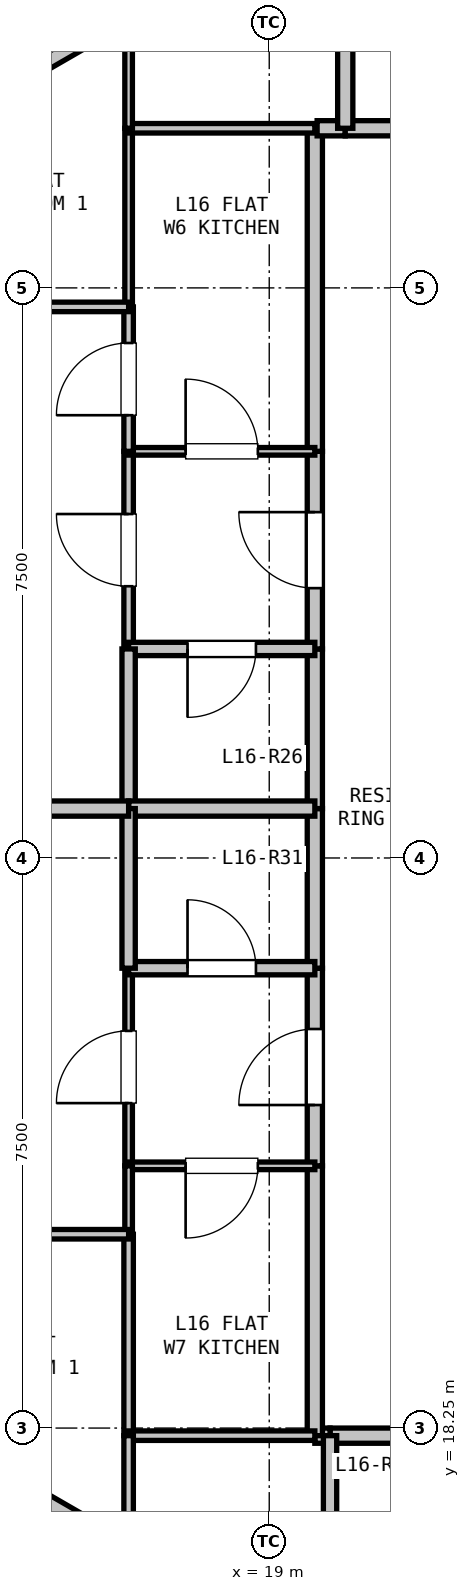
"""IFC4 building model, lengths in metres.
Left out: names, types, materials, properties, quantities, classifications, styles, units other than length and angle.
Written with IfcOpenShell. Run it as: python <this file> out.ifc"""

import sys

from ifc_helpers import new_model, si_unit, direction, frame, frame_2d, origin, place, context, subcontext, project, spatial, rectangle, extrude, element, fill, save


model = new_model("IFC4")
c1 = context("Model", 3, precision=1e-05, world=origin(), true_north=direction((0.0, 1.0)))
c2 = subcontext(c1, "Body", "Model", "MODEL_VIEW")
j1 = project(units=[si_unit("LENGTHUNIT", "METRE"), si_unit("PLANEANGLEUNIT", "RADIAN")], contexts=[c1])
p1 = place(None, origin())
s1 = spatial("IfcSite", under=j1, at=p1, CompositionType="ELEMENT")
p2 = place(p1, origin())
s2 = spatial("IfcBuilding", under=s1, at=p2, CompositionType="ELEMENT")
p3 = place(p2, frame((0.0, 0.0, 58.8)))
s3 = spatial("IfcBuildingStorey", under=s2, at=p3, CompositionType="ELEMENT", Elevation=58.8)
for number, where, z_axis, x_axis in (
    (1, (15.008, 35.611, 0.0), (0.0, 0.0, 1.0), (0.866, 0.5, 0.0)),
    (2, (16.48, 17.039, 0.0), (0.0, 0.0, 1.0), (-0.866, 0.5, 0.0)),
):
    element("IfcWall", number, at=place(p3, frame(where, z_axis=z_axis, x_axis=x_axis)), inside=s3, PredefinedType="PARAPET", context=c2, shape_type="SweptSolid", body=[
        extrude(rectangle(XDim=1.7, YDim=0.2, at=frame_2d((0.85, 0.0))), origin(), (0.0, 0.0, 1.0), 2.64),
    ])
p4 = place(p3, frame((21.8, 18.15, 0.0), z_axis=(0.0, 0.0, 1.0), x_axis=(-1.0, 0.0, 0.0)))
e3 = element("IfcWall", 3, at=p4, inside=s3, PredefinedType="PARTITIONING", context=c2, shape_type="SweptSolid", body=[
    extrude(rectangle(XDim=2.0, YDim=0.2, at=frame_2d((1.0, 0.0))), origin(), (0.0, 0.0, 1.0), 3.02),
])
p5 = place(p3, frame((19.8, 18.15, 0.0), z_axis=(0.0, 0.0, 1.0), x_axis=(-1.0, 0.0, 0.0)))
e4 = element("IfcWall", 4, at=p5, inside=s3, PredefinedType="PARTITIONING", context=c2, shape_type="SweptSolid", body=[
    extrude(rectangle(XDim=0.2, YDim=0.2, at=frame_2d((0.1, 0.0))), origin(), (0.0, 0.0, 1.0), 3.02),
])
p6 = place(p3, frame((19.6, 18.15, 0.0), z_axis=(0.0, 0.0, 1.0), x_axis=(0.0, 1.0, 0.0)))
e5 = element("IfcWall", 5, at=p6, inside=s3, PredefinedType="PARTITIONING", context=c2, shape_type="SweptSolid", body=[
    extrude(rectangle(XDim=3.55, YDim=0.2, at=frame_2d((1.775, 0.0))), origin(), (0.0, 0.0, 1.0), 2.317),
])
p7 = place(p3, frame((19.6, 21.7, 0.0), z_axis=(0.0, 0.0, 1.0), x_axis=(0.0, 1.0, 0.0)))
e6 = element("IfcWall", 6, at=p7, inside=s3, PredefinedType="PARTITIONING", context=c2, shape_type="SweptSolid", body=[
    extrude(rectangle(XDim=2.6, YDim=0.2, at=frame_2d((1.3, 0.0))), origin(), (0.0, 0.0, 1.0), 3.02),
])
p8 = place(p7, frame((0.8, 0.0, 0.0)))
e7 = element("IfcOpeningElement", 7, at=p8, cuts=e6, PredefinedType="OPENING", context=c2, shape_type="SweptSolid", body=[
    extrude(rectangle(XDim=1.0, YDim=2.15, at=frame_2d((0.5, 1.075))), frame((0.0, 0.11, 0.0), z_axis=(0.0, -1.0, 0.0), x_axis=(1.0, 0.0, 0.0)), (0.0, 0.0, 1.0), 0.22),
])
p9 = place(p3, frame((19.6, 24.3, 0.0), z_axis=(0.0, 0.0, 1.0), x_axis=(0.0, 1.0, 0.0)))
e8 = element("IfcWall", 8, at=p9, inside=s3, PredefinedType="PARTITIONING", context=c2, shape_type="SweptSolid", body=[
    extrude(rectangle(XDim=2.1, YDim=0.2, at=frame_2d((1.05, 0.0))), origin(), (0.0, 0.0, 1.0), 3.02),
])
p10 = place(p3, frame((19.6, 26.4, 0.0), z_axis=(0.0, 0.0, 1.0), x_axis=(0.0, 1.0, 0.0)))
e9 = element("IfcWall", 9, at=p10, inside=s3, PredefinedType="PARTITIONING", context=c2, shape_type="SweptSolid", body=[
    extrude(rectangle(XDim=2.1, YDim=0.2, at=frame_2d((1.05, 0.0))), origin(), (0.0, 0.0, 1.0), 3.02),
])
p11 = place(p3, frame((19.6, 28.5, 0.0), z_axis=(0.0, 0.0, 1.0), x_axis=(0.0, 1.0, 0.0)))
e10 = element("IfcWall", 10, at=p11, inside=s3, PredefinedType="PARTITIONING", context=c2, shape_type="SweptSolid", body=[
    extrude(rectangle(XDim=2.6, YDim=0.2, at=frame_2d((1.3, 0.0))), origin(), (0.0, 0.0, 1.0), 3.02),
])
p12 = place(p11, frame((0.8, 0.0, 0.0)))
e11 = element("IfcOpeningElement", 11, at=p12, cuts=e10, PredefinedType="OPENING", context=c2, shape_type="SweptSolid", body=[
    extrude(rectangle(XDim=1.0, YDim=2.15, at=frame_2d((0.5, 1.075))), frame((0.0, 0.11, 0.0), z_axis=(0.0, -1.0, 0.0), x_axis=(1.0, 0.0, 0.0)), (0.0, 0.0, 1.0), 0.22),
])
p13 = place(p3, frame((19.6, 31.1, 0.0), z_axis=(0.0, 0.0, 1.0), x_axis=(0.0, 1.0, 0.0)))
e12 = element("IfcWall", 12, at=p13, inside=s3, PredefinedType="PARTITIONING", context=c2, shape_type="SweptSolid", body=[
    extrude(rectangle(XDim=4.25, YDim=0.2, at=frame_2d((2.125, 0.0))), origin(), (0.0, 0.0, 1.0), 2.317),
])
p14 = place(p3, frame((19.63, 35.35, 0.0), z_axis=(0.0, 0.0, 1.0), x_axis=(1.0, 0.0, 0.0)))
e13 = element("IfcWall", 13, at=p14, inside=s3, PredefinedType="PARTITIONING", context=c2, shape_type="SweptSolid", body=[
    extrude(rectangle(XDim=0.37, YDim=0.2, at=frame_2d((0.185, 0.0))), origin(), (0.0, 0.0, 1.0), 3.02),
])
p15 = place(p3, frame((20.0, 35.35, 0.0), z_axis=(0.0, 0.0, 1.0), x_axis=(1.0, 0.0, 0.0)))
e14 = element("IfcWall", 14, at=p15, inside=s3, PredefinedType="PARTITIONING", context=c2, shape_type="SweptSolid", body=[
    extrude(rectangle(XDim=2.3, YDim=0.2, at=frame_2d((1.15, 0.0))), origin(), (0.0, 0.0, 1.0), 3.02),
])
p16 = place(p15, frame((0.725, 0.0, 0.0)))
e15 = element("IfcOpeningElement", 15, at=p16, cuts=e14, PredefinedType="OPENING", context=c2, shape_type="SweptSolid", body=[
    extrude(rectangle(XDim=0.85, YDim=2.1, at=frame_2d((0.425, 1.05))), frame((0.0, 0.11, 0.0), z_axis=(0.0, -1.0, 0.0), x_axis=(1.0, 0.0, 0.0)), (0.0, 0.0, 1.0), 0.22),
])
p17 = place(p3, frame((17.15, 28.5, 0.0), z_axis=(0.0, 0.0, 1.0), x_axis=(0.0, 1.0, 0.0)))
e16 = element("IfcWall", 16, at=p17, inside=s3, PredefinedType="PARTITIONING", context=c2, shape_type="SweptSolid", body=[
    extrude(rectangle(XDim=2.6, YDim=0.125, at=frame_2d((1.3, 0.0))), origin(), (0.0, 0.0, 1.0), 3.02),
])
p18 = place(p17, frame((0.825, 0.0, 0.0)))
e17 = element("IfcOpeningElement", 17, at=p18, cuts=e16, PredefinedType="OPENING", context=c2, shape_type="SweptSolid", body=[
    extrude(rectangle(XDim=0.95, YDim=2.1, at=frame_2d((0.475, 1.05))), frame((0.0, 0.073, 0.0), z_axis=(0.0, -1.0, 0.0), x_axis=(1.0, 0.0, 0.0)), (0.0, 0.0, 1.0), 0.145),
])
p19 = place(p3, frame((17.15, 31.1, 0.0), z_axis=(0.0, 0.0, 1.0), x_axis=(1.0, 0.0, 0.0)))
e18 = element("IfcWall", 18, at=p19, inside=s3, PredefinedType="PARTITIONING", context=c2, shape_type="SweptSolid", body=[
    extrude(rectangle(XDim=2.45, YDim=0.1, at=frame_2d((1.225, 0.0))), origin(), (0.0, 0.0, 1.0), 3.02),
])
p20 = place(p19, frame((0.75, 0.0, 0.0)))
e19 = element("IfcOpeningElement", 19, at=p20, cuts=e18, PredefinedType="OPENING", context=c2, shape_type="SweptSolid", body=[
    extrude(rectangle(XDim=0.95, YDim=2.1, at=frame_2d((0.475, 1.05))), frame((0.0, 0.06, 0.0), z_axis=(0.0, -1.0, 0.0), x_axis=(1.0, 0.0, 0.0)), (0.0, 0.0, 1.0), 0.12),
])
p21 = place(p3, frame((19.6, 28.5, 0.0), z_axis=(0.0, 0.0, 1.0), x_axis=(-1.0, 0.0, 0.0)))
e20 = element("IfcWall", 20, at=p21, inside=s3, PredefinedType="PLUMBINGWALL", context=c2, shape_type="SweptSolid", body=[
    extrude(rectangle(XDim=2.45, YDim=0.175, at=frame_2d((1.225, 0.0))), origin(), (0.0, 0.0, 1.0), 3.02),
])
p22 = place(p21, frame((0.775, 0.0, 0.0)))
e21 = element("IfcOpeningElement", 21, at=p22, cuts=e20, PredefinedType="OPENING", context=c2, shape_type="SweptSolid", body=[
    extrude(rectangle(XDim=0.9, YDim=2.1, at=frame_2d((0.45, 1.05))), frame((0.0, 0.097, 0.0), z_axis=(0.0, -1.0, 0.0), x_axis=(1.0, 0.0, 0.0)), (0.0, 0.0, 1.0), 0.195),
])
p23 = place(p3, frame((17.15, 21.7, 0.0), z_axis=(0.0, 0.0, 1.0), x_axis=(0.0, 1.0, 0.0)))
e22 = element("IfcWall", 22, at=p23, inside=s3, PredefinedType="PARTITIONING", context=c2, shape_type="SweptSolid", body=[
    extrude(rectangle(XDim=2.6, YDim=0.1, at=frame_2d((1.3, 0.0))), origin(), (0.0, 0.0, 1.0), 3.02),
])
p24 = place(p23, frame((0.825, 0.0, 0.0)))
e23 = element("IfcOpeningElement", 23, at=p24, cuts=e22, PredefinedType="OPENING", context=c2, shape_type="SweptSolid", body=[
    extrude(rectangle(XDim=0.95, YDim=2.1, at=frame_2d((0.475, 1.05))), frame((0.0, 0.06, 0.0), z_axis=(0.0, -1.0, 0.0), x_axis=(1.0, 0.0, 0.0)), (0.0, 0.0, 1.0), 0.12),
])
p25 = place(p3, frame((17.15, 24.3, 0.0), z_axis=(0.0, 0.0, 1.0), x_axis=(1.0, 0.0, 0.0)))
e24 = element("IfcWall", 24, at=p25, inside=s3, PredefinedType="PLUMBINGWALL", context=c2, shape_type="SweptSolid", body=[
    extrude(rectangle(XDim=2.45, YDim=0.175, at=frame_2d((1.225, 0.0))), origin(), (0.0, 0.0, 1.0), 3.02),
])
p26 = place(p25, frame((0.775, 0.0, 0.0)))
e25 = element("IfcOpeningElement", 25, at=p26, cuts=e24, PredefinedType="OPENING", context=c2, shape_type="SweptSolid", body=[
    extrude(rectangle(XDim=0.9, YDim=2.1, at=frame_2d((0.45, 1.05))), frame((0.0, 0.097, 0.0), z_axis=(0.0, -1.0, 0.0), x_axis=(1.0, 0.0, 0.0)), (0.0, 0.0, 1.0), 0.195),
])
p27 = place(p3, frame((19.6, 21.7, 0.0), z_axis=(0.0, 0.0, 1.0), x_axis=(-1.0, 0.0, 0.0)))
e26 = element("IfcWall", 26, at=p27, inside=s3, PredefinedType="PARTITIONING", context=c2, shape_type="SweptSolid", body=[
    extrude(rectangle(XDim=2.45, YDim=0.1, at=frame_2d((1.225, 0.0))), origin(), (0.0, 0.0, 1.0), 2.317),
])
p28 = place(p27, frame((0.75, 0.0, 0.0)))
e27 = element("IfcOpeningElement", 27, at=p28, cuts=e26, PredefinedType="OPENING", context=c2, shape_type="SweptSolid", body=[
    extrude(rectangle(XDim=0.95, YDim=2.1, at=frame_2d((0.475, 1.05))), frame((0.0, 0.06, 0.0), z_axis=(0.0, -1.0, 0.0), x_axis=(1.0, 0.0, 0.0)), (0.0, 0.0, 1.0), 0.12),
])
p29 = place(p3, frame((19.8, 14.956, 0.0), z_axis=(0.0, 0.0, 1.0), x_axis=(0.0, 1.0, 0.0)))
e28 = element("IfcWall", 28, at=p29, inside=s3, PredefinedType="PLUMBINGWALL", context=c2, shape_type="SweptSolid", body=[
    extrude(rectangle(XDim=3.194, YDim=0.175, at=frame_2d((1.597, 0.0))), origin(), (0.0, 0.0, 1.0), 2.365),
])
p30 = place(p3, frame((17.15, 26.4, 0.0), z_axis=(0.0, 0.0, 1.0), x_axis=(0.0, 1.0, 0.0)))
e29 = element("IfcWall", 29, at=p30, inside=s3, PredefinedType="PLUMBINGWALL", context=c2, shape_type="SweptSolid", body=[
    extrude(rectangle(XDim=2.1, YDim=0.175, at=frame_2d((1.05, 0.0))), origin(), (0.0, 0.0, 1.0), 3.02),
])
p31 = place(p3, frame((19.6, 26.4, 0.0), z_axis=(0.0, 0.0, 1.0), x_axis=(-1.0, 0.0, 0.0)))
e30 = element("IfcWall", 30, at=p31, inside=s3, PredefinedType="PARTITIONING", context=c2, shape_type="SweptSolid", body=[
    extrude(rectangle(XDim=2.45, YDim=0.2, at=frame_2d((1.225, 0.0))), origin(), (0.0, 0.0, 1.0), 3.02),
])
p32 = place(p3, frame((17.15, 31.1, 0.0), z_axis=(0.0, 0.0, 1.0), x_axis=(0.0, 1.0, 0.0)))
e31 = element("IfcWall", 31, at=p32, inside=s3, PredefinedType="PARTITIONING", context=c2, shape_type="SweptSolid", body=[
    extrude(rectangle(XDim=1.9, YDim=0.125, at=frame_2d((0.95, 0.0))), origin(), (0.0, 0.0, 1.0), 2.317),
])
p33 = place(p32, frame((0.475, 0.0, 0.0)))
e32 = element("IfcOpeningElement", 32, at=p33, cuts=e31, PredefinedType="OPENING", context=c2, shape_type="SweptSolid", body=[
    extrude(rectangle(XDim=0.95, YDim=2.1, at=frame_2d((0.475, 1.05))), frame((0.0, 0.073, 0.0), z_axis=(0.0, -1.0, 0.0), x_axis=(1.0, 0.0, 0.0)), (0.0, 0.0, 1.0), 0.145),
])
p34 = place(p3, frame((17.15, 33.0, 0.0), z_axis=(0.0, 0.0, 1.0), x_axis=(0.0, 1.0, 0.0)))
e33 = element("IfcWall", 33, at=p34, inside=s3, PredefinedType="PARTITIONING", context=c2, shape_type="SweptSolid", body=[
    extrude(rectangle(XDim=2.35, YDim=0.1, at=frame_2d((1.175, 0.0))), origin(), (0.0, 0.0, 1.0), 3.02),
])
p35 = place(p3, frame((17.15, 35.35, 0.0), z_axis=(0.0, 0.0, 1.0), x_axis=(1.0, 0.0, 0.0)))
e34 = element("IfcWall", 34, at=p35, inside=s3, PredefinedType="PARTITIONING", context=c2, shape_type="SweptSolid", body=[
    extrude(rectangle(XDim=2.45, YDim=0.125, at=frame_2d((1.225, 0.0))), origin(), (0.0, 0.0, 1.0), 3.02),
])
p36 = place(p3, frame((17.15, 24.3, 0.0), z_axis=(0.0, 0.0, 1.0), x_axis=(0.0, 1.0, 0.0)))
e35 = element("IfcWall", 35, at=p36, inside=s3, PredefinedType="PLUMBINGWALL", context=c2, shape_type="SweptSolid", body=[
    extrude(rectangle(XDim=2.1, YDim=0.175, at=frame_2d((1.05, 0.0))), origin(), (0.0, 0.0, 1.0), 3.02),
])
p37 = place(p3, frame((17.15, 18.15, 0.0), z_axis=(0.0, 0.0, 1.0), x_axis=(0.0, 1.0, 0.0)))
e36 = element("IfcWall", 36, at=p37, inside=s3, PredefinedType="PARTITIONING", context=c2, shape_type="SweptSolid", body=[
    extrude(rectangle(XDim=2.65, YDim=0.125, at=frame_2d((1.325, 0.0))), origin(), (0.0, 0.0, 1.0), 3.02),
])
p38 = place(p3, frame((17.15, 20.8, 0.0), z_axis=(0.0, 0.0, 1.0), x_axis=(0.0, 1.0, 0.0)))
e37 = element("IfcWall", 37, at=p38, inside=s3, PredefinedType="PARTITIONING", context=c2, shape_type="SweptSolid", body=[
    extrude(rectangle(XDim=0.9, YDim=0.1, at=frame_2d((0.45, 0.0))), origin(), (0.0, 0.0, 1.0), 2.317),
])
p39 = place(p3, frame((19.6, 18.15, 0.0), z_axis=(0.0, 0.0, 1.0), x_axis=(-1.0, 0.0, 0.0)))
e38 = element("IfcWall", 38, at=p39, inside=s3, PredefinedType="PARTITIONING", context=c2, shape_type="SweptSolid", body=[
    extrude(rectangle(XDim=2.45, YDim=0.125, at=frame_2d((1.225, 0.0))), origin(), (0.0, 0.0, 1.0), 3.02),
])
p40 = place(p3, frame((20.0, 35.35, 0.0), z_axis=(0.0, 0.0, 1.0), x_axis=(0.0, 1.0, 0.0)))
e39 = element("IfcWall", 39, at=p40, inside=s3, PredefinedType="PARTITIONING", context=c2, shape_type="SweptSolid", body=[
    extrude(rectangle(XDim=3.31, YDim=0.2, at=frame_2d((1.655, 0.0))), origin(), (0.0, 0.0, 1.0), 2.365),
])
p41 = place(p3, frame((10.419, 33.0, 0.0), z_axis=(0.0, 0.0, 1.0), x_axis=(1.0, 0.0, 0.0)))
e40 = element("IfcWall", 40, at=p41, inside=s3, PredefinedType="PARTITIONING", context=c2, shape_type="SweptSolid", body=[
    extrude(rectangle(XDim=6.731, YDim=0.125, at=frame_2d((3.365, 0.0))), origin(), (0.0, 0.0, 1.0), 2.365),
])
p42 = place(p41, frame((2.89, 0.0, 0.0)))
e41 = element("IfcOpeningElement", 41, at=p42, cuts=e40, PredefinedType="OPENING", context=c2, shape_type="SweptSolid", body=[
    extrude(rectangle(XDim=0.95, YDim=2.1, at=frame_2d((0.475, 1.05))), frame((0.0, 0.073, 0.0), z_axis=(0.0, -1.0, 0.0), x_axis=(1.0, 0.0, 0.0)), (0.0, 0.0, 1.0), 0.145),
])
p43 = place(p3, frame((17.15, 26.4, 0.0), z_axis=(0.0, 0.0, 1.0), x_axis=(-1.0, 0.0, 0.0)))
e42 = element("IfcWall", 42, at=p43, inside=s3, PredefinedType="PARTITIONING", context=c2, shape_type="SweptSolid", body=[
    extrude(rectangle(XDim=13.175, YDim=0.2, at=frame_2d((6.588, 0.0))), origin(), (0.0, 0.0, 1.0), 2.63),
])
p44 = place(p3, frame((17.15, 37.014, 0.0), z_axis=(0.0, 0.0, 1.0), x_axis=(0.0, -1.0, 0.0)))
e43 = element("IfcWall", 43, at=p44, inside=s3, PredefinedType="PARTITIONING", context=c2, shape_type="SweptSolid", body=[
    extrude(rectangle(XDim=1.664, YDim=0.1, at=frame_2d((0.832, 0.0))), origin(), (0.0, 0.0, 1.0), 2.365),
])
p45 = place(p3, frame((17.15, 20.8, 0.0), z_axis=(0.0, 0.0, 1.0), x_axis=(-1.0, 0.0, 0.0)))
e44 = element("IfcWall", 44, at=p45, inside=s3, PredefinedType="PARTITIONING", context=c2, shape_type="SweptSolid", body=[
    extrude(rectangle(XDim=7.25, YDim=0.125, at=frame_2d((3.625, 0.0))), origin(), (0.0, 0.0, 1.0), 2.365),
])
p46 = place(p45, frame((3.15, 0.0, 0.0)))
e45 = element("IfcOpeningElement", 45, at=p46, cuts=e44, PredefinedType="OPENING", context=c2, shape_type="SweptSolid", body=[
    extrude(rectangle(XDim=0.95, YDim=2.1, at=frame_2d((0.475, 1.05))), frame((0.0, 0.073, 0.0), z_axis=(0.0, -1.0, 0.0), x_axis=(1.0, 0.0, 0.0)), (0.0, 0.0, 1.0), 0.145),
])
p47 = place(p3, frame((17.15, 18.15, 0.0), z_axis=(0.0, 0.0, 1.0), x_axis=(0.0, -1.0, 0.0)))
e46 = element("IfcWall", 46, at=p47, inside=s3, PredefinedType="PARTITIONING", context=c2, shape_type="SweptSolid", body=[
    extrude(rectangle(XDim=1.664, YDim=0.125, at=frame_2d((0.832, 0.0))), origin(), (0.0, 0.0, 1.0), 2.365),
])
p48 = place(p12, origin())
e47 = element("IfcDoor", 47, at=p48, inside=s3, OperationType="SINGLE_SWING_RIGHT", PredefinedType="DOOR", context=c2, shape_type="SweptSolid", body=[
    extrude(rectangle(XDim=1.0, YDim=2.15, at=frame_2d((0.5, 1.075))), frame((0.0, 0.025, 0.0), z_axis=(0.0, -1.0, 0.0), x_axis=(1.0, 0.0, 0.0)), (0.0, 0.0, 1.0), 0.05),
])
fill(e11, e47)
p49 = place(p8, origin())
e48 = element("IfcDoor", 48, at=p49, inside=s3, OperationType="SINGLE_SWING_LEFT", PredefinedType="DOOR", context=c2, shape_type="SweptSolid", body=[
    extrude(rectangle(XDim=1.0, YDim=2.15, at=frame_2d((0.5, 1.075))), frame((0.0, 0.025, 0.0), z_axis=(0.0, -1.0, 0.0), x_axis=(1.0, 0.0, 0.0)), (0.0, 0.0, 1.0), 0.05),
])
fill(e7, e48)
p50 = place(p22, origin())
e49 = element("IfcDoor", 49, at=p50, inside=s3, OperationType="SINGLE_SWING_RIGHT", PredefinedType="DOOR", context=c2, shape_type="SweptSolid", body=[
    extrude(rectangle(XDim=0.9, YDim=2.1, at=frame_2d((0.45, 1.05))), frame((0.0, 0.025, 0.0), z_axis=(0.0, -1.0, 0.0), x_axis=(1.0, 0.0, 0.0)), (0.0, 0.0, 1.0), 0.05),
])
fill(e21, e49)
p51 = place(p20, origin())
e50 = element("IfcDoor", 50, at=p51, inside=s3, OperationType="SINGLE_SWING_LEFT", PredefinedType="DOOR", context=c2, shape_type="SweptSolid", body=[
    extrude(rectangle(XDim=0.95, YDim=2.1, at=frame_2d((0.475, 1.05))), frame((0.0, 0.025, 0.0), z_axis=(0.0, -1.0, 0.0), x_axis=(1.0, 0.0, 0.0)), (0.0, 0.0, 1.0), 0.05),
])
fill(e19, e50)
p52 = place(p18, origin())
e51 = element("IfcDoor", 51, at=p52, inside=s3, OperationType="SINGLE_SWING_RIGHT", PredefinedType="DOOR", context=c2, shape_type="SweptSolid", body=[
    extrude(rectangle(XDim=0.95, YDim=2.1, at=frame_2d((0.475, 1.05))), frame((0.0, 0.025, 0.0), z_axis=(0.0, -1.0, 0.0), x_axis=(1.0, 0.0, 0.0)), (0.0, 0.0, 1.0), 0.05),
])
fill(e17, e51)
p53 = place(p26, origin())
e52 = element("IfcDoor", 52, at=p53, inside=s3, OperationType="SINGLE_SWING_LEFT", PredefinedType="DOOR", context=c2, shape_type="SweptSolid", body=[
    extrude(rectangle(XDim=0.9, YDim=2.1, at=frame_2d((0.45, 1.05))), frame((0.0, 0.025, 0.0), z_axis=(0.0, -1.0, 0.0), x_axis=(1.0, 0.0, 0.0)), (0.0, 0.0, 1.0), 0.05),
])
fill(e25, e52)
p54 = place(p28, origin())
e53 = element("IfcDoor", 53, at=p54, inside=s3, OperationType="SINGLE_SWING_RIGHT", PredefinedType="DOOR", context=c2, shape_type="SweptSolid", body=[
    extrude(rectangle(XDim=0.95, YDim=2.1, at=frame_2d((0.475, 1.05))), frame((0.0, 0.025, 0.0), z_axis=(0.0, -1.0, 0.0), x_axis=(1.0, 0.0, 0.0)), (0.0, 0.0, 1.0), 0.05),
])
fill(e27, e53)
p55 = place(p24, origin())
e54 = element("IfcDoor", 54, at=p55, inside=s3, OperationType="SINGLE_SWING_LEFT", PredefinedType="DOOR", context=c2, shape_type="SweptSolid", body=[
    extrude(rectangle(XDim=0.95, YDim=2.1, at=frame_2d((0.475, 1.05))), frame((0.0, 0.025, 0.0), z_axis=(0.0, -1.0, 0.0), x_axis=(1.0, 0.0, 0.0)), (0.0, 0.0, 1.0), 0.05),
])
fill(e23, e54)
p56 = place(p33, origin())
e55 = element("IfcDoor", 55, at=p56, inside=s3, OperationType="SINGLE_SWING_LEFT", PredefinedType="DOOR", context=c2, shape_type="SweptSolid", body=[
    extrude(rectangle(XDim=0.95, YDim=2.1, at=frame_2d((0.475, 1.05))), frame((0.0, 0.025, 0.0), z_axis=(0.0, -1.0, 0.0), x_axis=(1.0, 0.0, 0.0)), (0.0, 0.0, 1.0), 0.05),
])
fill(e32, e55)
save(model, sys.argv[1])
